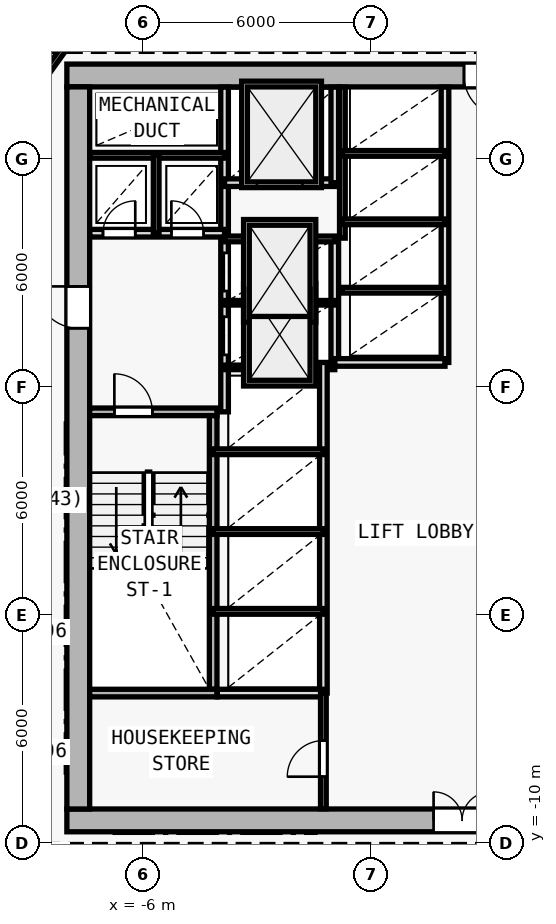
"""IFC4 building model, lengths in metres.
Left out: names, types, materials, properties, quantities, classifications, styles, units other than length and angle.
Written with IfcOpenShell. Run it as: python <this file> out.ifc"""

import sys

from ifc_helpers import new_model, si_unit, direction, frame, frame_2d, origin, origin_2d, place, context, subcontext, project, spatial, rectangle, i_section, extrude, element, fill, save


model = new_model("IFC4")
c1 = context("Model", 3, precision=1e-05, world=origin(), true_north=direction((0.0, 1.0)))
c2 = subcontext(c1, "Body", "Model", "MODEL_VIEW")
j1 = project(units=[si_unit("LENGTHUNIT", "METRE"), si_unit("PLANEANGLEUNIT", "RADIAN")], contexts=[c1])
p1 = place(None, origin())
s1 = spatial("IfcSite", under=j1, at=p1, CompositionType="ELEMENT")
p2 = place(p1, origin())
s2 = spatial("IfcBuilding", under=s1, at=p2, CompositionType="ELEMENT")
p3 = place(p2, frame((0.0, 0.0, 55.2)))
s3 = spatial("IfcBuildingStorey", under=s2, at=p3, CompositionType="ELEMENT", Elevation=55.2)
for number, where, z_axis, x_axis in (
    (1, (-7.7, -9.4, 0.0), (0.0, 0.0, 1.0), (1.0, 0.0, 0.0)),
    (2, (-7.7, 10.2, 0.0), (0.0, 0.0, 1.0), (1.0, 0.0, 0.0)),
    (3, (0.0, -9.4, 0.0), (0.0, 0.0, 1.0), (1.0, 0.0, 0.0)),
    (4, (-7.7, 2.0, 0.0), (0.0, 0.0, 1.0), (1.0, 0.0, 0.0)),
):
    element("IfcColumn", number, at=place(p3, frame(where, z_axis=z_axis, x_axis=x_axis)), inside=s3, PredefinedType="COLUMN", context=c2, shape_type="SweptSolid", body=[
        extrude(i_section(OverallWidth=0.416, OverallDepth=0.446, WebThickness=0.025, FlangeThickness=0.04, FilletRadius=0.015, at=origin_2d()), origin(), (0.0, 0.0, 1.0), 3.6),
    ])
p4 = place(p3, frame((-8.0, -9.4, 0.0), z_axis=(0.0, 0.0, 1.0), x_axis=(1.0, 0.0, 0.0)))
e5 = element("IfcWall", 5, at=p4, inside=s3, PredefinedType="SHEAR", context=c2, shape_type="SweptSolid", body=[
    extrude(rectangle(XDim=16.0, YDim=0.6, at=frame_2d((8.0, 0.0))), origin(), (0.0, 0.0, 1.0), 3.35),
])
p5 = place(p4, frame((9.65, 0.0, 0.0)))
e6 = element("IfcOpeningElement", 6, at=p5, cuts=e5, PredefinedType="OPENING", context=c2, shape_type="SweptSolid", body=[
    extrude(rectangle(XDim=1.5, YDim=2.2, at=frame_2d((0.75, 1.1))), frame((0.0, 0.31, 0.0), z_axis=(0.0, -1.0, 0.0), x_axis=(1.0, 0.0, 0.0)), (0.0, 0.0, 1.0), 0.62),
])
p6 = place(p3, frame((8.0, 10.2, 0.0), z_axis=(0.0, 0.0, 1.0), x_axis=(-1.0, 0.0, 0.0)))
e7 = element("IfcWall", 7, at=p6, inside=s3, PredefinedType="SHEAR", context=c2, shape_type="SweptSolid", body=[
    extrude(rectangle(XDim=16.0, YDim=0.6, at=frame_2d((8.0, 0.0))), origin(), (0.0, 0.0, 1.0), 3.35),
])
p7 = place(p6, frame((4.45, 0.0, 0.0)))
e8 = element("IfcOpeningElement", 8, at=p7, cuts=e7, PredefinedType="OPENING", context=c2, shape_type="SweptSolid", body=[
    extrude(rectangle(XDim=1.1, YDim=2.15, at=frame_2d((0.55, 1.075))), frame((0.0, 0.31, 0.0), z_axis=(0.0, -1.0, 0.0), x_axis=(1.0, 0.0, 0.0)), (0.0, 0.0, 1.0), 0.62),
])
p8 = place(p3, frame((-7.7, -9.1, 0.0), z_axis=(0.0, 0.0, 1.0), x_axis=(0.0, 1.0, 0.0)))
e9 = element("IfcWall", 9, at=p8, inside=s3, PredefinedType="SHEAR", context=c2, shape_type="SweptSolid", body=[
    extrude(rectangle(XDim=19.0, YDim=0.6, at=frame_2d((9.5, 0.0))), origin(), (0.0, 0.0, 1.0), 3.35),
])
p9 = place(p8, frame((12.65, 0.0, 0.0)))
e10 = element("IfcOpeningElement", 10, at=p9, cuts=e9, PredefinedType="OPENING", context=c2, shape_type="SweptSolid", body=[
    extrude(rectangle(XDim=1.1, YDim=2.15, at=frame_2d((0.55, 1.075))), frame((0.0, 0.31, 0.0), z_axis=(0.0, -1.0, 0.0), x_axis=(1.0, 0.0, 0.0)), (0.0, 0.0, 1.0), 0.62),
])
p10 = place(p3, frame((-7.4, 1.35, 0.0), z_axis=(0.0, 0.0, 1.0), x_axis=(1.0, 0.0, 0.0)))
e11 = element("IfcWall", 11, at=p10, inside=s3, PredefinedType="SOLIDWALL", context=c2, shape_type="SweptSolid", body=[
    extrude(rectangle(XDim=3.35, YDim=0.2, at=frame_2d((1.675, 0.0))), origin(), (0.0, 0.0, 1.0), 3.35),
])
p11 = place(p10, frame((0.65, 0.0, 0.0)))
e12 = element("IfcOpeningElement", 12, at=p11, cuts=e11, PredefinedType="OPENING", context=c2, shape_type="SweptSolid", body=[
    extrude(rectangle(XDim=1.0, YDim=2.15, at=frame_2d((0.5, 1.075))), frame((0.0, 0.11, 0.0), z_axis=(0.0, -1.0, 0.0), x_axis=(1.0, 0.0, 0.0)), (0.0, 0.0, 1.0), 0.22),
])
p12 = place(p3, frame((-4.15, -5.95, 0.0), z_axis=(0.0, 0.0, 1.0), x_axis=(0.0, 1.0, 0.0)))
e13 = element("IfcWall", 13, at=p12, inside=s3, PredefinedType="SOLIDWALL", context=c2, shape_type="SweptSolid", body=[
    extrude(rectangle(XDim=7.2, YDim=0.2, at=frame_2d((3.6, 0.0))), origin(), (0.0, 0.0, 1.0), 3.35),
])
p13 = place(p3, frame((-3.85, 1.35, 0.0), z_axis=(0.0, 0.0, 1.0), x_axis=(0.0, 1.0, 0.0)))
e14 = element("IfcWall", 14, at=p13, inside=s3, PredefinedType="SOLIDWALL", context=c2, shape_type="SweptSolid", body=[
    extrude(rectangle(XDim=8.545, YDim=0.2, at=frame_2d((4.272, 0.0))), origin(), (0.0, 0.0, 1.0), 3.35),
])
p14 = place(p13, frame((1.5, 0.0, 0.0)))
e15 = element("IfcOpeningElement", 15, at=p14, cuts=e14, PredefinedType="OPENING", context=c2, shape_type="SweptSolid", body=[
    extrude(rectangle(XDim=1.0, YDim=2.15, at=frame_2d((0.5, 1.075))), frame((0.0, 0.11, 0.0), z_axis=(0.0, -1.0, 0.0), x_axis=(1.0, 0.0, 0.0)), (0.0, 0.0, 1.0), 0.22),
])
p15 = place(p13, frame((3.18, 0.0, 0.0)))
e16 = element("IfcOpeningElement", 16, at=p15, cuts=e14, PredefinedType="OPENING", context=c2, shape_type="SweptSolid", body=[
    extrude(rectangle(XDim=1.0, YDim=2.15, at=frame_2d((0.5, 1.075))), frame((0.0, 0.11, 0.0), z_axis=(0.0, -1.0, 0.0), x_axis=(1.0, 0.0, 0.0)), (0.0, 0.0, 1.0), 0.22),
])
p16 = place(p3, frame((-7.395, 6.05, 0.0), z_axis=(0.0, 0.0, 1.0), x_axis=(1.0, 0.0, 0.0)))
e17 = element("IfcWall", 17, at=p16, inside=s3, PredefinedType="SOLIDWALL", context=c2, shape_type="SweptSolid", body=[
    extrude(rectangle(XDim=3.545, YDim=0.2, at=frame_2d((1.772, 0.0))), origin(), (0.0, 0.0, 1.0), 3.35),
])
p17 = place(p16, frame((0.345, 0.0, 0.0)))
e18 = element("IfcOpeningElement", 18, at=p17, cuts=e17, PredefinedType="OPENING", context=c2, shape_type="SweptSolid", body=[
    extrude(rectangle(XDim=0.85, YDim=2.1, at=frame_2d((0.425, 1.05))), frame((0.0, 0.11, 0.0), z_axis=(0.0, -1.0, 0.0), x_axis=(1.0, 0.0, 0.0)), (0.0, 0.0, 1.0), 0.22),
])
p18 = place(p16, frame((2.145, 0.0, 0.0)))
e19 = element("IfcOpeningElement", 19, at=p18, cuts=e17, PredefinedType="OPENING", context=c2, shape_type="SweptSolid", body=[
    extrude(rectangle(XDim=0.85, YDim=2.1, at=frame_2d((0.425, 1.05))), frame((0.0, 0.11, 0.0), z_axis=(0.0, -1.0, 0.0), x_axis=(1.0, 0.0, 0.0)), (0.0, 0.0, 1.0), 0.22),
])
p19 = place(p3, frame((-7.395, 8.1, 0.0), z_axis=(0.0, 0.0, 1.0), x_axis=(1.0, 0.0, 0.0)))
e20 = element("IfcWall", 20, at=p19, inside=s3, PredefinedType="PARTITIONING", context=c2, shape_type="SweptSolid", body=[
    extrude(rectangle(XDim=3.545, YDim=0.15, at=frame_2d((1.772, 0.0))), origin(), (0.0, 0.0, 1.0), 3.35),
])
p20 = place(p3, frame((-5.65, 6.05, 0.0), z_axis=(0.0, 0.0, 1.0), x_axis=(0.0, 1.0, 0.0)))
e21 = element("IfcWall", 21, at=p20, inside=s3, PredefinedType="PARTITIONING", context=c2, shape_type="SweptSolid", body=[
    extrude(rectangle(XDim=2.05, YDim=0.15, at=frame_2d((1.025, 0.0))), origin(), (0.0, 0.0, 1.0), 3.35),
])
p21 = place(p3, frame((-0.95, 2.65, 0.0), z_axis=(0.0, 0.0, 1.0), x_axis=(0.0, 1.0, 0.0)))
e22 = element("IfcWall", 22, at=p21, inside=s3, PredefinedType="SOLIDWALL", context=c2, shape_type="SweptSolid", body=[
    extrude(rectangle(XDim=3.27, YDim=0.2, at=frame_2d((1.635, 0.0))), origin(), (0.0, 0.0, 1.0), 3.35),
])
for number, where, z_axis, x_axis in (
    (23, (-3.85, 2.52, 0.0), (0.0, 0.0, 1.0), (1.0, 0.0, 0.0)),
    (24, (-3.85, 4.22, 0.0), (0.0, 0.0, 1.0), (1.0, 0.0, 0.0)),
):
    element("IfcWall", number, at=place(p3, frame(where, z_axis=z_axis, x_axis=x_axis)), inside=s3, PredefinedType="PARTITIONING", context=c2, shape_type="SweptSolid", body=[
        extrude(rectangle(XDim=2.9, YDim=0.12, at=frame_2d((1.45, 0.0))), origin(), (0.0, 0.0, 1.0), 3.35),
    ])
p22 = place(p3, frame((-3.85, 5.9, 0.0), z_axis=(0.0, 0.0, 1.0), x_axis=(1.0, 0.0, 0.0)))
e25 = element("IfcWall", 25, at=p22, inside=s3, PredefinedType="PARTITIONING", context=c2, shape_type="SweptSolid", body=[
    extrude(rectangle(XDim=2.9, YDim=0.15, at=frame_2d((1.45, 0.0))), origin(), (0.0, 0.0, 1.0), 3.35),
])
p23 = place(p3, frame((-3.85, 7.38, 0.0), z_axis=(0.0, 0.0, 1.0), x_axis=(1.0, 0.0, 0.0)))
e26 = element("IfcWall", 26, at=p23, inside=s3, PredefinedType="SOLIDWALL", context=c2, shape_type="SweptSolid", body=[
    extrude(rectangle(XDim=2.9, YDim=0.2, at=frame_2d((1.45, 0.0))), origin(), (0.0, 0.0, 1.0), 3.35),
])
p24 = place(p23, frame((0.85, 0.0, 0.0)))
e27 = element("IfcOpeningElement", 27, at=p24, cuts=e26, PredefinedType="OPENING", context=c2, shape_type="SweptSolid", body=[
    extrude(rectangle(XDim=1.2, YDim=2.2, at=frame_2d((0.6, 1.1))), frame((0.0, 0.11, 0.0), z_axis=(0.0, -1.0, 0.0), x_axis=(1.0, 0.0, 0.0)), (0.0, 0.0, 1.0), 0.22),
])
p25 = place(p3, frame((-0.95, 7.38, 0.0), z_axis=(0.0, 0.0, 1.0), x_axis=(0.0, 1.0, 0.0)))
e28 = element("IfcWall", 28, at=p25, inside=s3, PredefinedType="SOLIDWALL", context=c2, shape_type="SweptSolid", body=[
    extrude(rectangle(XDim=2.515, YDim=0.2, at=frame_2d((1.258, 0.0))), origin(), (0.0, 0.0, 1.0), 3.35),
])
p26 = place(p3, frame((-1.25, -6.05, 0.0), z_axis=(0.0, 0.0, 1.0), x_axis=(0.0, 1.0, 0.0)))
e29 = element("IfcWall", 29, at=p26, inside=s3, PredefinedType="SOLIDWALL", context=c2, shape_type="SweptSolid", body=[
    extrude(rectangle(XDim=8.7, YDim=0.2, at=frame_2d((4.35, 0.0))), origin(), (0.0, 0.0, 1.0), 3.35),
])
for number, where, z_axis, x_axis in (
    (30, (-4.15, -3.9, 0.0), (0.0, 0.0, 1.0), (1.0, 0.0, 0.0)),
    (31, (-4.15, -1.8, 0.0), (0.0, 0.0, 1.0), (1.0, 0.0, 0.0)),
    (32, (-4.15, 0.3, 0.0), (0.0, 0.0, 1.0), (1.0, 0.0, 0.0)),
):
    element("IfcWall", number, at=place(p3, frame(where, z_axis=z_axis, x_axis=x_axis)), inside=s3, PredefinedType="PARTITIONING", context=c2, shape_type="SweptSolid", body=[
        extrude(rectangle(XDim=2.9, YDim=0.15, at=frame_2d((1.45, 0.0))), origin(), (0.0, 0.0, 1.0), 3.35),
    ])
p27 = place(p3, frame((1.95, 2.65, 0.0), z_axis=(0.0, 0.0, 1.0), x_axis=(0.0, 1.0, 0.0)))
e33 = element("IfcWall", 33, at=p27, inside=s3, PredefinedType="SOLIDWALL", context=c2, shape_type="SweptSolid", body=[
    extrude(rectangle(XDim=7.245, YDim=0.2, at=frame_2d((3.623, 0.0))), origin(), (0.0, 0.0, 1.0), 3.35),
])
p28 = place(p3, frame((-0.95, 2.65, 0.0), z_axis=(0.0, 0.0, 1.0), x_axis=(1.0, 0.0, 0.0)))
e34 = element("IfcWall", 34, at=p28, inside=s3, PredefinedType="SOLIDWALL", context=c2, shape_type="SweptSolid", body=[
    extrude(rectangle(XDim=2.9, YDim=0.2, at=frame_2d((1.45, 0.0))), origin(), (0.0, 0.0, 1.0), 3.35),
])
p29 = place(p3, frame((-0.75, 5.92, 0.0), z_axis=(0.0, 0.0, 1.0), x_axis=(0.0, 1.0, 0.0)))
e35 = element("IfcWall", 35, at=p29, inside=s3, PredefinedType="PARTITIONING", context=c2, shape_type="SweptSolid", body=[
    extrude(rectangle(XDim=3.975, YDim=0.15, at=frame_2d((1.988, 0.0))), origin(), (0.0, 0.0, 1.0), 3.35),
])
for number, where, z_axis, x_axis in (
    (36, (-0.75, 4.55, 0.0), (0.0, 0.0, 1.0), (1.0, 0.0, 0.0)),
    (37, (-0.75, 6.35, 0.0), (0.0, 0.0, 1.0), (1.0, 0.0, 0.0)),
    (38, (-0.75, 8.15, 0.0), (0.0, 0.0, 1.0), (1.0, 0.0, 0.0)),
):
    element("IfcWall", number, at=place(p3, frame(where, z_axis=z_axis, x_axis=x_axis)), inside=s3, PredefinedType="PARTITIONING", context=c2, shape_type="SweptSolid", body=[
        extrude(rectangle(XDim=2.7, YDim=0.15, at=frame_2d((1.35, 0.0))), origin(), (0.0, 0.0, 1.0), 3.35),
    ])
p30 = place(p3, frame((-7.4, -6.05, 0.0), z_axis=(0.0, 0.0, 1.0), x_axis=(1.0, 0.0, 0.0)))
e39 = element("IfcWall", 39, at=p30, inside=s3, PredefinedType="SOLIDWALL", context=c2, shape_type="SweptSolid", body=[
    extrude(rectangle(XDim=3.35, YDim=0.2, at=frame_2d((1.675, 0.0))), origin(), (0.0, 0.0, 1.0), 3.35),
])
p31 = place(p3, frame((-4.04, -6.05, 0.0), z_axis=(0.0, 0.0, 1.0), x_axis=(1.0, 0.0, 0.0)))
e40 = element("IfcWall", 40, at=p31, inside=s3, PredefinedType="SOLIDWALL", context=c2, shape_type="SweptSolid", body=[
    extrude(rectangle(XDim=2.79, YDim=0.2, at=frame_2d((1.395, 0.0))), origin(), (0.0, 0.0, 1.0), 3.35),
])
p32 = place(p3, frame((-1.25, -9.095, 0.0), z_axis=(0.0, 0.0, 1.0), x_axis=(0.0, 1.0, 0.0)))
e41 = element("IfcWall", 41, at=p32, inside=s3, PredefinedType="PARTITIONING", context=c2, shape_type="SweptSolid", body=[
    extrude(rectangle(XDim=3.045, YDim=0.15, at=frame_2d((1.522, 0.0))), origin(), (0.0, 0.0, 1.0), 3.35),
])
p33 = place(p32, frame((0.845, 0.0, 0.0)))
e42 = element("IfcOpeningElement", 42, at=p33, cuts=e41, PredefinedType="OPENING", context=c2, shape_type="SweptSolid", body=[
    extrude(rectangle(XDim=0.95, YDim=2.1, at=frame_2d((0.475, 1.05))), frame((0.0, 0.085, 0.0), z_axis=(0.0, -1.0, 0.0), x_axis=(1.0, 0.0, 0.0)), (0.0, 0.0, 1.0), 0.17),
])
p34 = place(p3, frame((-9.86, 8.426, 0.0), z_axis=(0.0, 0.0, 1.0), x_axis=(0.582449511476, 0.812866881218, 0.0)))
e43 = element("IfcWall", 43, at=p34, inside=s3, PredefinedType="PARTITIONING", context=c2, shape_type="SweptSolid", body=[
    extrude(rectangle(XDim=4.84, YDim=0.15, at=frame_2d((2.42, 0.0))), origin(), (0.0, 0.0, 1.0), 2.725),
])
p35 = place(p5, origin())
e44 = element("IfcDoor", 44, at=p35, inside=s3, OperationType="DOUBLE_DOOR_SINGLE_SWING", PredefinedType="DOOR", context=c2, shape_type="SweptSolid", body=[
    extrude(rectangle(XDim=1.5, YDim=2.2, at=frame_2d((0.75, 1.1))), frame((0.0, 0.025, 0.0), z_axis=(0.0, -1.0, 0.0), x_axis=(1.0, 0.0, 0.0)), (0.0, 0.0, 1.0), 0.05),
])
fill(e6, e44)
p36 = place(p9, origin())
e45 = element("IfcDoor", 45, at=p36, inside=s3, OperationType="SINGLE_SWING_RIGHT", PredefinedType="DOOR", context=c2, shape_type="SweptSolid", body=[
    extrude(rectangle(XDim=1.1, YDim=2.15, at=frame_2d((0.55, 1.075))), frame((0.0, 0.025, 0.0), z_axis=(0.0, -1.0, 0.0), x_axis=(1.0, 0.0, 0.0)), (0.0, 0.0, 1.0), 0.05),
])
fill(e10, e45)
p37 = place(p7, origin())
e46 = element("IfcDoor", 46, at=p37, inside=s3, OperationType="SINGLE_SWING_LEFT", PredefinedType="DOOR", context=c2, shape_type="SweptSolid", body=[
    extrude(rectangle(XDim=1.1, YDim=2.15, at=frame_2d((0.55, 1.075))), frame((0.0, 0.025, 0.0), z_axis=(0.0, -1.0, 0.0), x_axis=(1.0, 0.0, 0.0)), (0.0, 0.0, 1.0), 0.05),
])
fill(e8, e46)
p38 = place(p11, origin())
e47 = element("IfcDoor", 47, at=p38, inside=s3, OperationType="SINGLE_SWING_LEFT", PredefinedType="DOOR", context=c2, shape_type="SweptSolid", body=[
    extrude(rectangle(XDim=1.0, YDim=2.15, at=frame_2d((0.5, 1.075))), frame((0.0, 0.025, 0.0), z_axis=(0.0, -1.0, 0.0), x_axis=(1.0, 0.0, 0.0)), (0.0, 0.0, 1.0), 0.05),
])
fill(e12, e47)
p39 = place(p17, origin())
e48 = element("IfcDoor", 48, at=p39, inside=s3, OperationType="SINGLE_SWING_RIGHT", PredefinedType="DOOR", context=c2, shape_type="SweptSolid", body=[
    extrude(rectangle(XDim=0.85, YDim=2.1, at=frame_2d((0.425, 1.05))), frame((0.0, 0.025, 0.0), z_axis=(0.0, -1.0, 0.0), x_axis=(1.0, 0.0, 0.0)), (0.0, 0.0, 1.0), 0.05),
])
fill(e18, e48)
p40 = place(p18, origin())
e49 = element("IfcDoor", 49, at=p40, inside=s3, OperationType="SINGLE_SWING_LEFT", PredefinedType="DOOR", context=c2, shape_type="SweptSolid", body=[
    extrude(rectangle(XDim=0.85, YDim=2.1, at=frame_2d((0.425, 1.05))), frame((0.0, 0.025, 0.0), z_axis=(0.0, -1.0, 0.0), x_axis=(1.0, 0.0, 0.0)), (0.0, 0.0, 1.0), 0.05),
])
fill(e19, e49)
p41 = place(p24, origin())
e50 = element("IfcDoor", 50, at=p41, inside=s3, OperationType="DOUBLE_DOOR_SLIDING", PredefinedType="DOOR", context=c2, shape_type="SweptSolid", body=[
    extrude(rectangle(XDim=1.2, YDim=2.2, at=frame_2d((0.6, 1.1))), frame((0.0, 0.025, 0.0), z_axis=(0.0, -1.0, 0.0), x_axis=(1.0, 0.0, 0.0)), (0.0, 0.0, 1.0), 0.05),
])
fill(e27, e50)
p42 = place(p14, origin())
e51 = element("IfcDoor", 51, at=p42, inside=s3, OperationType="DOUBLE_DOOR_SLIDING", PredefinedType="DOOR", context=c2, shape_type="SweptSolid", body=[
    extrude(rectangle(XDim=1.0, YDim=2.15, at=frame_2d((0.5, 1.075))), frame((0.0, 0.025, 0.0), z_axis=(0.0, -1.0, 0.0), x_axis=(1.0, 0.0, 0.0)), (0.0, 0.0, 1.0), 0.05),
])
fill(e15, e51)
p43 = place(p15, origin())
e52 = element("IfcDoor", 52, at=p43, inside=s3, OperationType="DOUBLE_DOOR_SLIDING", PredefinedType="DOOR", context=c2, shape_type="SweptSolid", body=[
    extrude(rectangle(XDim=1.0, YDim=2.15, at=frame_2d((0.5, 1.075))), frame((0.0, 0.025, 0.0), z_axis=(0.0, -1.0, 0.0), x_axis=(1.0, 0.0, 0.0)), (0.0, 0.0, 1.0), 0.05),
])
fill(e16, e52)
p44 = place(p33, origin())
e53 = element("IfcDoor", 53, at=p44, inside=s3, OperationType="SINGLE_SWING_LEFT", PredefinedType="DOOR", context=c2, shape_type="SweptSolid", body=[
    extrude(rectangle(XDim=0.95, YDim=2.1, at=frame_2d((0.475, 1.05))), frame((0.0, 0.025, 0.0), z_axis=(0.0, -1.0, 0.0), x_axis=(1.0, 0.0, 0.0)), (0.0, 0.0, 1.0), 0.05),
])
fill(e42, e53)
save(model, sys.argv[1])
